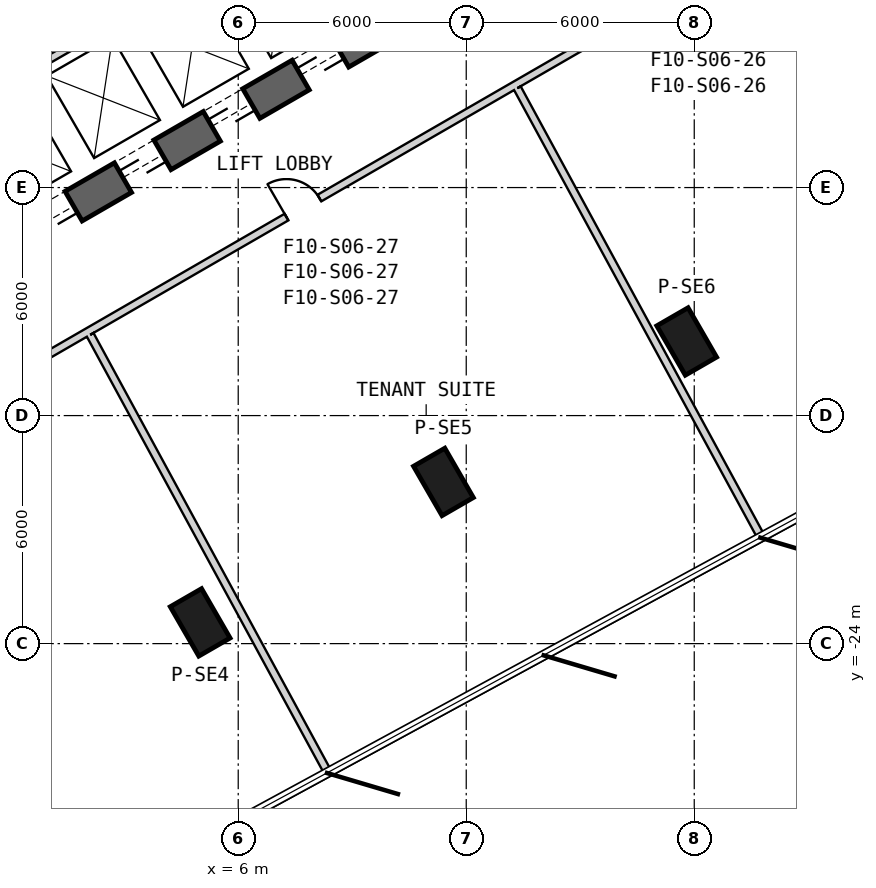
"""IFC4 building model, lengths in metres.
Left out: names, types, materials, properties, quantities, classifications, styles, units other than length and angle.
Written with IfcOpenShell. Run it as: python <this file> out.ifc"""

import sys

from ifc_helpers import new_model, si_unit, direction, frame, frame_2d, origin, origin_2d, place, context, subcontext, project, spatial, rectangle, extrude, element, fill, save


model = new_model("IFC4")
c1 = context("Model", 3, precision=1e-05, world=origin(), true_north=direction((0.0, 1.0)))
c2 = subcontext(c1, "Body", "Model", "MODEL_VIEW")
j1 = project(units=[si_unit("LENGTHUNIT", "METRE"), si_unit("PLANEANGLEUNIT", "RADIAN")], contexts=[c1])
p1 = place(None, origin())
s1 = spatial("IfcSite", under=j1, at=p1, CompositionType="ELEMENT")
p2 = place(p1, origin())
s2 = spatial("IfcBuilding", under=s1, at=p2, CompositionType="ELEMENT")
p3 = place(p2, frame((0.0, 0.0, 119.3)))
s3 = spatial("IfcBuildingStorey", under=s2, at=p3, CompositionType="ELEMENT", Elevation=119.3)
for number, where, z_axis, x_axis in (
    (1, (4.999, -23.441, 0.0), (0.0, 0.0, 1.0), (0.5, -0.866, 0.0)),
    (2, (11.4, -19.746, 0.0), (0.0, 0.0, 1.0), (0.5, -0.866, 0.0)),
    (3, (17.801, -16.05, 0.0), (0.0, 0.0, 1.0), (0.5, -0.866, 0.0)),
):
    element("IfcColumn", number, at=place(p3, frame(where, z_axis=z_axis, x_axis=x_axis)), inside=s3, PredefinedType="COLUMN", context=c2, shape_type="SweptSolid", body=[
        extrude(rectangle(XDim=1.5, YDim=0.95, at=origin_2d()), origin(), (0.0, 0.0, 1.0), 4.1),
    ])
p4 = place(p3, frame((-7.825, -17.97, 0.0), z_axis=(0.0, 0.0, 1.0), x_axis=(0.866028369851, 0.499994862586, 0.0)))
e4 = element("IfcWall", 4, at=p4, inside=s3, PredefinedType="SHEAR", context=c2, shape_type="SweptSolid", body=[
    extrude(rectangle(XDim=31.523, YDim=0.9, at=frame_2d((15.762, 0.0))), origin(), (0.0, 0.0, 1.0), 4.1),
])
p5 = place(p4, frame((7.062, 0.0, 0.0)))
e5 = element("IfcOpeningElement", 5, at=p5, cuts=e4, PredefinedType="OPENING", context=c2, shape_type="SweptSolid", body=[
    extrude(rectangle(XDim=1.2, YDim=2.4, at=frame_2d((0.6, 1.2))), frame((0.0, 0.46, 0.0), z_axis=(0.0, -1.0, 0.0), x_axis=(1.0, 0.0, 0.0)), (0.0, 0.0, 1.0), 0.92),
])
p6 = place(p4, frame((9.762, 0.0, 0.0)))
e6 = element("IfcOpeningElement", 6, at=p6, cuts=e4, PredefinedType="OPENING", context=c2, shape_type="SweptSolid", body=[
    extrude(rectangle(XDim=1.2, YDim=2.4, at=frame_2d((0.6, 1.2))), frame((0.0, 0.46, 0.0), z_axis=(0.0, -1.0, 0.0), x_axis=(1.0, 0.0, 0.0)), (0.0, 0.0, 1.0), 0.92),
])
p7 = place(p4, frame((12.462, 0.0, 0.0)))
e7 = element("IfcOpeningElement", 7, at=p7, cuts=e4, PredefinedType="OPENING", context=c2, shape_type="SweptSolid", body=[
    extrude(rectangle(XDim=1.2, YDim=2.4, at=frame_2d((0.6, 1.2))), frame((0.0, 0.46, 0.0), z_axis=(0.0, -1.0, 0.0), x_axis=(1.0, 0.0, 0.0)), (0.0, 0.0, 1.0), 0.92),
])
p8 = place(p4, frame((15.162, 0.0, 0.0)))
e8 = element("IfcOpeningElement", 8, at=p8, cuts=e4, PredefinedType="OPENING", context=c2, shape_type="SweptSolid", body=[
    extrude(rectangle(XDim=1.2, YDim=2.4, at=frame_2d((0.6, 1.2))), frame((0.0, 0.46, 0.0), z_axis=(0.0, -1.0, 0.0), x_axis=(1.0, 0.0, 0.0)), (0.0, 0.0, 1.0), 0.92),
])
p9 = place(p4, frame((17.862, 0.0, 0.0)))
e9 = element("IfcOpeningElement", 9, at=p9, cuts=e4, PredefinedType="OPENING", context=c2, shape_type="SweptSolid", body=[
    extrude(rectangle(XDim=1.2, YDim=2.4, at=frame_2d((0.6, 1.2))), frame((0.0, 0.46, 0.0), z_axis=(0.0, -1.0, 0.0), x_axis=(1.0, 0.0, 0.0)), (0.0, 0.0, 1.0), 0.92),
])
p10 = place(p4, frame((20.562, 0.0, 0.0)))
e10 = element("IfcOpeningElement", 10, at=p10, cuts=e4, PredefinedType="OPENING", context=c2, shape_type="SweptSolid", body=[
    extrude(rectangle(XDim=1.2, YDim=2.4, at=frame_2d((0.6, 1.2))), frame((0.0, 0.46, 0.0), z_axis=(0.0, -1.0, 0.0), x_axis=(1.0, 0.0, 0.0)), (0.0, 0.0, 1.0), 0.92),
])
p11 = place(p4, frame((26.712, 0.0, 0.0)))
e11 = element("IfcOpeningElement", 11, at=p11, cuts=e4, PredefinedType="OPENING", context=c2, shape_type="SweptSolid", body=[
    extrude(rectangle(XDim=1.2, YDim=2.4, at=frame_2d((0.6, 1.2))), frame((0.0, 0.46, 0.0), z_axis=(0.0, -1.0, 0.0), x_axis=(1.0, 0.0, 0.0)), (0.0, 0.0, 1.0), 0.92),
])
p12 = place(p4, frame((3.612, 0.0, 0.0)))
e12 = element("IfcOpeningElement", 12, at=p12, cuts=e4, PredefinedType="OPENING", context=c2, shape_type="SweptSolid", body=[
    extrude(rectangle(XDim=1.2, YDim=2.4, at=frame_2d((0.6, 1.2))), frame((0.0, 0.46, 0.0), z_axis=(0.0, -1.0, 0.0), x_axis=(1.0, 0.0, 0.0)), (0.0, 0.0, 1.0), 0.92),
])
p13 = place(p3, frame((0.483, -8.936, 0.0), z_axis=(0.0, 0.0, 1.0), x_axis=(0.866030989016, 0.499990325971, 0.0)))
e13 = element("IfcWall", 13, at=p13, inside=s3, PredefinedType="PLUMBINGWALL", context=c2, shape_type="SweptSolid", body=[
    extrude(rectangle(XDim=8.1, YDim=0.2, at=frame_2d((4.05, 0.0))), origin(), (0.0, 0.0, 1.0), 3.8),
])
p14 = place(p3, frame((-6.852, -20.93, 0.0), z_axis=(0.0, 0.0, 1.0), x_axis=(0.866023703603, 0.500002944789, 0.0)))
e14 = element("IfcWall", 14, at=p14, inside=s3, PredefinedType="PARTITIONING", context=c2, shape_type="SweptSolid", body=[
    extrude(rectangle(XDim=32.599, YDim=0.2, at=frame_2d((16.299, 0.0))), origin(), (0.0, 0.0, 1.0), 2.98),
])
p15 = place(p14, frame((27.463, 0.0, 0.0)))
e15 = element("IfcOpeningElement", 15, at=p15, cuts=e14, PredefinedType="OPENING", context=c2, shape_type="SweptSolid", body=[
    extrude(rectangle(XDim=1.0, YDim=2.1, at=frame_2d((0.5, 1.05))), frame((0.0, 0.11, 0.0), z_axis=(0.0, -1.0, 0.0), x_axis=(1.0, 0.0, 0.0)), (0.0, 0.0, 1.0), 0.22),
])
p16 = place(p14, frame((16.307, 0.0, 0.0)))
e16 = element("IfcOpeningElement", 16, at=p16, cuts=e14, PredefinedType="OPENING", context=c2, shape_type="SweptSolid", body=[
    extrude(rectangle(XDim=1.0, YDim=2.1, at=frame_2d((0.5, 1.05))), frame((0.0, 0.11, 0.0), z_axis=(0.0, -1.0, 0.0), x_axis=(1.0, 0.0, 0.0)), (0.0, 0.0, 1.0), 0.22),
])
p17 = place(p14, frame((4.694, 0.0, 0.0)))
e17 = element("IfcOpeningElement", 17, at=p17, cuts=e14, PredefinedType="OPENING", context=c2, shape_type="SweptSolid", body=[
    extrude(rectangle(XDim=1.0, YDim=2.1, at=frame_2d((0.5, 1.05))), frame((0.0, 0.11, 0.0), z_axis=(0.0, -1.0, 0.0), x_axis=(1.0, 0.0, 0.0)), (0.0, 0.0, 1.0), 0.22),
])
p18 = place(p3, frame((13.345, -9.385, 0.0), z_axis=(0.0, 0.0, 1.0), x_axis=(0.477273420177, -0.878754847721, 0.0)))
e18 = element("IfcWall", 18, at=p18, inside=s3, PredefinedType="PARTITIONING", context=c2, shape_type="SweptSolid", body=[
    extrude(rectangle(XDim=13.442, YDim=0.2, at=frame_2d((6.721, 0.0))), origin(), (0.0, 0.0, 1.0), 3.08),
])
p19 = place(p3, frame((8.358, -27.39, 0.0), z_axis=(0.0, 0.0, 1.0), x_axis=(-0.477258783959, 0.878762796854, 0.0)))
e19 = element("IfcWall", 19, at=p19, inside=s3, PredefinedType="PARTITIONING", context=c2, shape_type="SweptSolid", body=[
    extrude(rectangle(XDim=13.104, YDim=0.2, at=frame_2d((6.552, 0.0))), origin(), (0.0, 0.0, 1.0), 3.08),
])
p20 = place(p16, origin())
e20 = element("IfcDoor", 20, at=p20, inside=s3, OperationType="SINGLE_SWING_RIGHT", PredefinedType="USERDEFINED", context=c2, shape_type="SweptSolid", body=[
    extrude(rectangle(XDim=1.0, YDim=2.1, at=frame_2d((0.5, 1.05))), frame((0.0, 0.025, 0.0), z_axis=(0.0, -1.0, 0.0), x_axis=(1.0, 0.0, 0.0)), (0.0, 0.0, 1.0), 0.05),
])
fill(e16, e20)
p21 = place(p6, origin())
e21 = element("IfcDoor", 21, at=p21, inside=s3, OperationType="SLIDING_TO_LEFT", PredefinedType="USERDEFINED", context=c2, shape_type="SweptSolid", body=[
    extrude(rectangle(XDim=1.2, YDim=2.4, at=frame_2d((0.6, 1.2))), frame((0.0, 0.025, 0.0), z_axis=(0.0, -1.0, 0.0), x_axis=(1.0, 0.0, 0.0)), (0.0, 0.0, 1.0), 0.05),
])
fill(e6, e21)
p22 = place(p7, origin())
e22 = element("IfcDoor", 22, at=p22, inside=s3, OperationType="SLIDING_TO_LEFT", PredefinedType="USERDEFINED", context=c2, shape_type="SweptSolid", body=[
    extrude(rectangle(XDim=1.2, YDim=2.4, at=frame_2d((0.6, 1.2))), frame((0.0, 0.025, 0.0), z_axis=(0.0, -1.0, 0.0), x_axis=(1.0, 0.0, 0.0)), (0.0, 0.0, 1.0), 0.05),
])
fill(e7, e22)
p23 = place(p8, origin())
e23 = element("IfcDoor", 23, at=p23, inside=s3, OperationType="SLIDING_TO_LEFT", PredefinedType="USERDEFINED", context=c2, shape_type="SweptSolid", body=[
    extrude(rectangle(XDim=1.2, YDim=2.4, at=frame_2d((0.6, 1.2))), frame((0.0, 0.025, 0.0), z_axis=(0.0, -1.0, 0.0), x_axis=(1.0, 0.0, 0.0)), (0.0, 0.0, 1.0), 0.05),
])
fill(e8, e23)
p24 = place(p9, origin())
e24 = element("IfcDoor", 24, at=p24, inside=s3, OperationType="SLIDING_TO_LEFT", PredefinedType="USERDEFINED", context=c2, shape_type="SweptSolid", body=[
    extrude(rectangle(XDim=1.2, YDim=2.4, at=frame_2d((0.6, 1.2))), frame((0.0, 0.025, 0.0), z_axis=(0.0, -1.0, 0.0), x_axis=(1.0, 0.0, 0.0)), (0.0, 0.0, 1.0), 0.05),
])
fill(e9, e24)
save(model, sys.argv[1])
